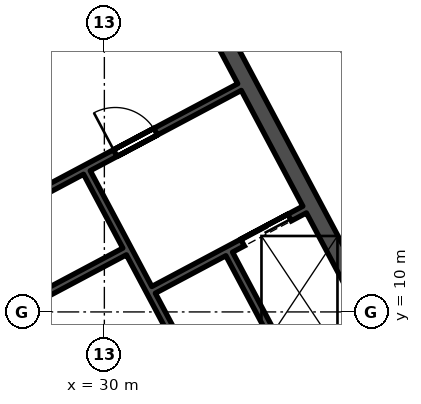
"""IFC4 building model, lengths in metres.
Left out: names, types, materials, properties, quantities, classifications, styles, units other than length and angle.
Written with IfcOpenShell. Run it as: python <this file> out.ifc"""

import sys

from ifc_helpers import new_model, si_unit, direction, frame, frame_2d, origin, place, context, subcontext, project, spatial, rectangle, extrude, element, fill, save


model = new_model("IFC4")
c1 = context("Model", 3, precision=1e-05, world=origin(), true_north=direction((0.0, 1.0)))
c2 = subcontext(c1, "Body", "Model", "MODEL_VIEW")
j1 = project(units=[si_unit("LENGTHUNIT", "METRE"), si_unit("PLANEANGLEUNIT", "RADIAN")], contexts=[c1])
p1 = place(None, origin())
s1 = spatial("IfcSite", under=j1, at=p1, CompositionType="ELEMENT")
p2 = place(p1, origin())
s2 = spatial("IfcBuilding", under=s1, at=p2, CompositionType="ELEMENT")
p3 = place(p2, frame((0.0, 0.0, 261.9)))
s3 = spatial("IfcBuildingStorey", under=s2, at=p3, CompositionType="ELEMENT", Elevation=261.9)
p4 = place(p3, frame((37.439, 9.091, 0.0), z_axis=(0.0, 0.0, 1.0), x_axis=(-0.469467968382, 0.882949504028, 0.0)))
e1 = element("IfcWall", 1, at=p4, inside=s3, PredefinedType="SHEAR", context=c2, shape_type="SweptSolid", body=[
    extrude(rectangle(XDim=19.1, YDim=0.45, at=frame_2d((9.55, 0.0))), origin(), (0.0, 0.0, 1.0), 3.9),
])
p5 = place(p4, frame((10.15, 0.0, 0.0)))
e2 = element("IfcOpeningElement", 2, at=p5, cuts=e1, PredefinedType="OPENING", context=c2, shape_type="SweptSolid", body=[
    extrude(rectangle(XDim=2.4, YDim=2.4, at=frame_2d((1.2, 1.2))), frame((0.0, 0.235, 0.0), z_axis=(0.0, -1.0, 0.0), x_axis=(1.0, 0.0, 0.0)), (0.0, 0.0, 1.0), 0.47),
])
p6 = place(p3, frame((32.968, 7.223, 0.0), z_axis=(0.0, 0.0, 1.0), x_axis=(-0.469480409012, 0.88294288918, 0.0)))
e3 = element("IfcWall", 3, at=p6, inside=s3, PredefinedType="SHEAR", context=c2, shape_type="SweptSolid", body=[
    extrude(rectangle(XDim=7.3, YDim=0.2, at=frame_2d((3.65, 0.0))), origin(), (0.0, 0.0, 1.0), 3.9),
])
p7 = place(p3, frame((34.999, 8.303, 0.0), z_axis=(0.0, 0.0, 1.0), x_axis=(-0.4694665462, 0.882950260207, 0.0)))
e4 = element("IfcWall", 4, at=p7, inside=s3, PredefinedType="SHEAR", context=c2, shape_type="SweptSolid", body=[
    extrude(rectangle(XDim=3.65, YDim=0.2, at=frame_2d((1.825, 0.0))), origin(), (0.0, 0.0, 1.0), 3.9),
])
p8 = place(p3, frame((31.296, 10.581, 0.0), z_axis=(0.0, 0.0, 1.0), x_axis=(0.882960433586, 0.469447412093, 0.0)))
e5 = element("IfcWall", 5, at=p8, inside=s3, PredefinedType="SHEAR", context=c2, shape_type="SweptSolid", body=[
    extrude(rectangle(XDim=4.5, YDim=0.2, at=frame_2d((2.25, 0.0))), origin(), (0.0, 0.0, 1.0), 3.9),
])
p9 = place(p8, frame((2.65, 0.0, 0.0)))
e6 = element("IfcOpeningElement", 6, at=p9, cuts=e5, PredefinedType="OPENING", context=c2, shape_type="SweptSolid", body=[
    extrude(rectangle(XDim=1.4, YDim=2.4, at=frame_2d((0.7, 1.2))), frame((0.0, 0.11, 0.0), z_axis=(0.0, -1.0, 0.0), x_axis=(1.0, 0.0, 0.0)), (0.0, 0.0, 1.0), 0.22),
])
p10 = place(p3, frame((25.941, 9.15, 0.0), z_axis=(0.0, 0.0, 1.0), x_axis=(0.882953967957, 0.469459572775, 0.0)))
e7 = element("IfcWall", 7, at=p10, inside=s3, PredefinedType="SHEAR", context=c2, shape_type="SweptSolid", body=[
    extrude(rectangle(XDim=5.2, YDim=0.2, at=frame_2d((2.6, 0.0))), origin(), (0.0, 0.0, 1.0), 3.9),
])
p11 = place(p3, frame((24.726, 11.222, 0.0), z_axis=(0.0, 0.0, 1.0), x_axis=(0.882940221191, 0.469485426614, 0.0)))
e8 = element("IfcWall", 8, at=p11, inside=s3, PredefinedType="SHEAR", context=c2, shape_type="SweptSolid", body=[
    extrude(rectangle(XDim=10.0, YDim=0.2, at=frame_2d((5.0, 0.0))), origin(), (0.0, 0.0, 1.0), 3.9),
])
p12 = place(p11, frame((6.3, 0.0, 0.0)))
e9 = element("IfcOpeningElement", 9, at=p12, cuts=e8, PredefinedType="OPENING", context=c2, shape_type="SweptSolid", body=[
    extrude(rectangle(XDim=1.2, YDim=2.1, at=frame_2d((0.6, 1.05))), frame((0.0, 0.11, 0.0), z_axis=(0.0, -1.0, 0.0), x_axis=(1.0, 0.0, 0.0)), (0.0, 0.0, 1.0), 0.22),
])
p13 = place(p11, frame((2.25, 0.0, 0.0)))
e10 = element("IfcOpeningElement", 10, at=p13, cuts=e8, PredefinedType="OPENING", context=c2, shape_type="SweptSolid", body=[
    extrude(rectangle(XDim=0.9, YDim=2.1, at=frame_2d((0.45, 1.05))), frame((0.0, 0.11, 0.0), z_axis=(0.0, -1.0, 0.0), x_axis=(1.0, 0.0, 0.0)), (0.0, 0.0, 1.0), 0.22),
])
p14 = place(p3, frame((24.807, 15.116, 0.0), z_axis=(0.0, 0.0, 1.0), x_axis=(0.882942972946, 0.469480251476, 0.0)))
e11 = element("IfcWall", 11, at=p14, inside=s3, PredefinedType="SHEAR", context=c2, shape_type="SweptSolid", body=[
    extrude(rectangle(XDim=5.4, YDim=0.2, at=frame_2d((2.7, 0.0))), origin(), (0.0, 0.0, 1.0), 3.9),
])
p15 = place(p14, frame((2.25, 0.0, 0.0)))
e12 = element("IfcOpeningElement", 12, at=p15, cuts=e11, PredefinedType="OPENING", context=c2, shape_type="SweptSolid", body=[
    extrude(rectangle(XDim=0.9, YDim=2.1, at=frame_2d((0.45, 1.05))), frame((0.0, 0.11, 0.0), z_axis=(0.0, -1.0, 0.0), x_axis=(1.0, 0.0, 0.0)), (0.0, 0.0, 1.0), 0.22),
])
p16 = place(p3, frame((0.0, 14.044, 0.0), z_axis=(0.0, 0.0, 1.0), x_axis=(0.882952097871, 0.469463089992, 0.0)))
e13 = element("IfcWall", 13, at=p16, inside=s3, PredefinedType="PARTITIONING", context=c2, shape_type="SweptSolid", body=[
    extrude(rectangle(XDim=33.607, YDim=0.15, at=frame_2d((16.803, 0.0))), origin(), (0.0, 0.0, 1.0), 3.54),
])
p17 = place(p12, origin())
e14 = element("IfcDoor", 14, at=p17, inside=s3, OperationType="SINGLE_SWING_LEFT", PredefinedType="DOOR", context=c2, shape_type="SweptSolid", body=[
    extrude(rectangle(XDim=1.2, YDim=2.1, at=frame_2d((0.6, 1.05))), frame((0.0, 0.025, 0.0), z_axis=(0.0, -1.0, 0.0), x_axis=(1.0, 0.0, 0.0)), (0.0, 0.0, 1.0), 0.05),
])
fill(e9, e14)
p18 = place(p9, origin())
e15 = element("IfcDoor", 15, at=p18, inside=s3, OperationType="DOUBLE_DOOR_SLIDING", PredefinedType="DOOR", context=c2, shape_type="SweptSolid", body=[
    extrude(rectangle(XDim=1.4, YDim=2.4, at=frame_2d((0.7, 1.2))), frame((0.0, 0.025, 0.0), z_axis=(0.0, -1.0, 0.0), x_axis=(1.0, 0.0, 0.0)), (0.0, 0.0, 1.0), 0.05),
])
fill(e6, e15)
save(model, sys.argv[1])
